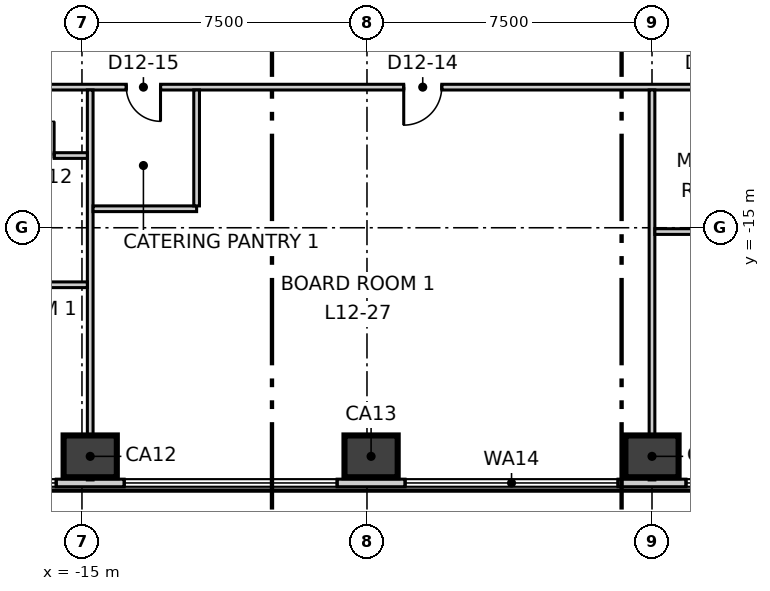
"""IFC4 building model, lengths in metres.
Left out: names, types, materials, properties, quantities, classifications, styles, units other than length and angle.
Written with IfcOpenShell. Run it as: python <this file> out.ifc"""

import sys

from ifc_helpers import new_model, si_unit, direction, frame, frame_2d, origin, origin_2d, place, context, subcontext, project, spatial, rectangle, extrude, element, fill, save


model = new_model("IFC4")
c1 = context("Model", 3, precision=1e-05, world=origin(), true_north=direction((0.0, 1.0)))
c2 = subcontext(c1, "Body", "Model", "MODEL_VIEW")
j1 = project(units=[si_unit("LENGTHUNIT", "METRE"), si_unit("PLANEANGLEUNIT", "RADIAN")], contexts=[c1])
p1 = place(None, origin())
s1 = spatial("IfcSite", under=j1, at=p1, CompositionType="ELEMENT")
p2 = place(p1, origin())
s2 = spatial("IfcBuilding", under=s1, at=p2, CompositionType="ELEMENT")
p3 = place(p2, frame((0.0, 0.0, 59.3)))
s3 = spatial("IfcBuildingStorey", under=s2, at=p3, CompositionType="ELEMENT", Elevation=59.3)
for number, where, z_axis, x_axis in (
    (1, (-14.783, -21.015, -0.3), (0.0, 0.0, 1.0), (1.0, 0.0, 0.0)),
    (2, (-7.392, -21.015, -0.3), (0.0, 0.0, 1.0), (1.0, 0.0, 0.0)),
    (3, (0.0, -21.015, -0.3), (0.0, 0.0, 1.0), (1.0, 0.0, 0.0)),
):
    element("IfcColumn", number, at=place(p3, frame(where, z_axis=z_axis, x_axis=x_axis)), inside=s3, PredefinedType="COLUMN", context=c2, shape_type="SweptSolid", body=[
        extrude(rectangle(XDim=1.4, YDim=1.1, at=origin_2d()), origin(), (0.0, 0.0, 1.0), 4.0),
    ])
p4 = place(p3, frame((-3.371, 37.591, 0.0), z_axis=(0.0, 0.0, 1.0), x_axis=(-0.500006313899, -0.866021758423, 0.0)))
e4 = element("IfcWall", 4, at=p4, inside=s3, PredefinedType="ELEMENTEDWALL", context=c2, shape_type="SweptSolid", body=[
    extrude(rectangle(XDim=61.719, YDim=0.2, at=frame_2d((30.859, 0.0))), origin(), (0.0, 0.0, 1.0), 3.7),
])
p5 = place(p4, frame((2.198, 0.0, 0.9)))
e5 = element("IfcOpeningElement", 5, at=p5, cuts=e4, PredefinedType="OPENING", context=c2, shape_type="SweptSolid", body=[
    extrude(rectangle(XDim=5.6, YDim=2.5, at=frame_2d((2.8, 1.25))), frame((0.0, 0.11, 0.0), z_axis=(0.0, -1.0, 0.0), x_axis=(1.0, 0.0, 0.0)), (0.0, 0.0, 1.0), 0.22),
])
p6 = place(p4, frame((9.59, 0.0, 0.9)))
e6 = element("IfcOpeningElement", 6, at=p6, cuts=e4, PredefinedType="OPENING", context=c2, shape_type="SweptSolid", body=[
    extrude(rectangle(XDim=5.6, YDim=2.5, at=frame_2d((2.8, 1.25))), frame((0.0, 0.11, 0.0), z_axis=(0.0, -1.0, 0.0), x_axis=(1.0, 0.0, 0.0)), (0.0, 0.0, 1.0), 0.22),
])
p7 = place(p4, frame((16.982, 0.0, 0.9)))
e7 = element("IfcOpeningElement", 7, at=p7, cuts=e4, PredefinedType="OPENING", context=c2, shape_type="SweptSolid", body=[
    extrude(rectangle(XDim=5.6, YDim=2.5, at=frame_2d((2.8, 1.25))), frame((0.0, 0.11, 0.0), z_axis=(0.0, -1.0, 0.0), x_axis=(1.0, 0.0, 0.0)), (0.0, 0.0, 1.0), 0.22),
])
p8 = place(p4, frame((24.373, 0.0, 0.9)))
e8 = element("IfcOpeningElement", 8, at=p8, cuts=e4, PredefinedType="OPENING", context=c2, shape_type="SweptSolid", body=[
    extrude(rectangle(XDim=5.6, YDim=2.5, at=frame_2d((2.8, 1.25))), frame((0.0, 0.11, 0.0), z_axis=(0.0, -1.0, 0.0), x_axis=(1.0, 0.0, 0.0)), (0.0, 0.0, 1.0), 0.22),
])
p9 = place(p4, frame((31.765, 0.0, 0.9)))
e9 = element("IfcOpeningElement", 9, at=p9, cuts=e4, PredefinedType="OPENING", context=c2, shape_type="SweptSolid", body=[
    extrude(rectangle(XDim=5.6, YDim=2.5, at=frame_2d((2.8, 1.25))), frame((0.0, 0.11, 0.0), z_axis=(0.0, -1.0, 0.0), x_axis=(1.0, 0.0, 0.0)), (0.0, 0.0, 1.0), 0.22),
])
p10 = place(p4, frame((39.157, 0.0, 0.9)))
e10 = element("IfcOpeningElement", 10, at=p10, cuts=e4, PredefinedType="OPENING", context=c2, shape_type="SweptSolid", body=[
    extrude(rectangle(XDim=5.6, YDim=2.5, at=frame_2d((2.8, 1.25))), frame((0.0, 0.11, 0.0), z_axis=(0.0, -1.0, 0.0), x_axis=(1.0, 0.0, 0.0)), (0.0, 0.0, 1.0), 0.22),
])
p11 = place(p4, frame((46.548, 0.0, 0.9)))
e11 = element("IfcOpeningElement", 11, at=p11, cuts=e4, PredefinedType="OPENING", context=c2, shape_type="SweptSolid", body=[
    extrude(rectangle(XDim=5.6, YDim=2.5, at=frame_2d((2.8, 1.25))), frame((0.0, 0.11, 0.0), z_axis=(0.0, -1.0, 0.0), x_axis=(1.0, 0.0, 0.0)), (0.0, 0.0, 1.0), 0.22),
])
p12 = place(p4, frame((53.94, 0.0, 0.9)))
e12 = element("IfcOpeningElement", 12, at=p12, cuts=e4, PredefinedType="OPENING", context=c2, shape_type="SweptSolid", body=[
    extrude(rectangle(XDim=5.6, YDim=2.5, at=frame_2d((2.8, 1.25))), frame((0.0, 0.11, 0.0), z_axis=(0.0, -1.0, 0.0), x_axis=(1.0, 0.0, 0.0)), (0.0, 0.0, 1.0), 0.22),
])
p13 = place(p3, frame((-30.869, -21.715, 0.0), z_axis=(0.0, 0.0, 1.0), x_axis=(1.0, 0.0, 0.0)))
e13 = element("IfcWall", 13, at=p13, inside=s3, PredefinedType="ELEMENTEDWALL", context=c2, shape_type="SweptSolid", body=[
    extrude(rectangle(XDim=61.718, YDim=0.2, at=frame_2d((30.859, 0.0))), origin(), (0.0, 0.0, 1.0), 3.7),
])
p14 = place(p13, frame((2.199, 0.0, 0.9)))
e14 = element("IfcOpeningElement", 14, at=p14, cuts=e13, PredefinedType="OPENING", context=c2, shape_type="SweptSolid", body=[
    extrude(rectangle(XDim=5.6, YDim=2.5, at=frame_2d((2.8, 1.25))), frame((0.0, 0.11, 0.0), z_axis=(0.0, -1.0, 0.0), x_axis=(1.0, 0.0, 0.0)), (0.0, 0.0, 1.0), 0.22),
])
p15 = place(p13, frame((9.59, 0.0, 0.9)))
e15 = element("IfcOpeningElement", 15, at=p15, cuts=e13, PredefinedType="OPENING", context=c2, shape_type="SweptSolid", body=[
    extrude(rectangle(XDim=5.6, YDim=2.5, at=frame_2d((2.8, 1.25))), frame((0.0, 0.11, 0.0), z_axis=(0.0, -1.0, 0.0), x_axis=(1.0, 0.0, 0.0)), (0.0, 0.0, 1.0), 0.22),
])
p16 = place(p13, frame((16.982, 0.0, 0.9)))
e16 = element("IfcOpeningElement", 16, at=p16, cuts=e13, PredefinedType="OPENING", context=c2, shape_type="SweptSolid", body=[
    extrude(rectangle(XDim=5.6, YDim=2.5, at=frame_2d((2.8, 1.25))), frame((0.0, 0.11, 0.0), z_axis=(0.0, -1.0, 0.0), x_axis=(1.0, 0.0, 0.0)), (0.0, 0.0, 1.0), 0.22),
])
p17 = place(p13, frame((24.373, 0.0, 0.9)))
e17 = element("IfcOpeningElement", 17, at=p17, cuts=e13, PredefinedType="OPENING", context=c2, shape_type="SweptSolid", body=[
    extrude(rectangle(XDim=5.6, YDim=2.5, at=frame_2d((2.8, 1.25))), frame((0.0, 0.11, 0.0), z_axis=(0.0, -1.0, 0.0), x_axis=(1.0, 0.0, 0.0)), (0.0, 0.0, 1.0), 0.22),
])
p18 = place(p13, frame((31.765, 0.0, 0.9)))
e18 = element("IfcOpeningElement", 18, at=p18, cuts=e13, PredefinedType="OPENING", context=c2, shape_type="SweptSolid", body=[
    extrude(rectangle(XDim=5.6, YDim=2.5, at=frame_2d((2.8, 1.25))), frame((0.0, 0.11, 0.0), z_axis=(0.0, -1.0, 0.0), x_axis=(1.0, 0.0, 0.0)), (0.0, 0.0, 1.0), 0.22),
])
p19 = place(p13, frame((39.156, 0.0, 0.9)))
e19 = element("IfcOpeningElement", 19, at=p19, cuts=e13, PredefinedType="OPENING", context=c2, shape_type="SweptSolid", body=[
    extrude(rectangle(XDim=5.6, YDim=2.5, at=frame_2d((2.8, 1.25))), frame((0.0, 0.11, 0.0), z_axis=(0.0, -1.0, 0.0), x_axis=(1.0, 0.0, 0.0)), (0.0, 0.0, 1.0), 0.22),
])
p20 = place(p13, frame((46.548, 0.0, 0.9)))
e20 = element("IfcOpeningElement", 20, at=p20, cuts=e13, PredefinedType="OPENING", context=c2, shape_type="SweptSolid", body=[
    extrude(rectangle(XDim=5.6, YDim=2.5, at=frame_2d((2.8, 1.25))), frame((0.0, 0.11, 0.0), z_axis=(0.0, -1.0, 0.0), x_axis=(1.0, 0.0, 0.0)), (0.0, 0.0, 1.0), 0.22),
])
p21 = place(p13, frame((53.939, 0.0, 0.9)))
e21 = element("IfcOpeningElement", 21, at=p21, cuts=e13, PredefinedType="OPENING", context=c2, shape_type="SweptSolid", body=[
    extrude(rectangle(XDim=5.6, YDim=2.5, at=frame_2d((2.8, 1.25))), frame((0.0, 0.11, 0.0), z_axis=(0.0, -1.0, 0.0), x_axis=(1.0, 0.0, 0.0)), (0.0, 0.0, 1.0), 0.22),
])
p22 = place(p3, frame((-19.497, -11.17, 0.0), z_axis=(0.0, 0.0, 1.0), x_axis=(0.499998854553, 0.866026065108, 0.0)))
e22 = element("IfcWall", 22, at=p22, inside=s3, PredefinedType="PARTITIONING", context=c2, shape_type="SweptSolid", body=[
    extrude(rectangle(XDim=38.994, YDim=0.15, at=frame_2d((19.497, 0.0))), origin(), (0.0, 0.0, 1.0), 3.7),
])
p23 = place(p22, frame((36.044, 0.0, 0.0)))
e23 = element("IfcOpeningElement", 23, at=p23, cuts=e22, PredefinedType="OPENING", context=c2, shape_type="SweptSolid", body=[
    extrude(rectangle(XDim=1.1, YDim=2.1, at=frame_2d((0.55, 1.05))), frame((0.0, 0.085, 0.0), z_axis=(0.0, -1.0, 0.0), x_axis=(1.0, 0.0, 0.0)), (0.0, 0.0, 1.0), 0.17),
])
p24 = place(p22, frame((21.855, 0.0, 0.0)))
e24 = element("IfcOpeningElement", 24, at=p24, cuts=e22, PredefinedType="OPENING", context=c2, shape_type="SweptSolid", body=[
    extrude(rectangle(XDim=1.1, YDim=2.1, at=frame_2d((0.55, 1.05))), frame((0.0, 0.085, 0.0), z_axis=(0.0, -1.0, 0.0), x_axis=(1.0, 0.0, 0.0)), (0.0, 0.0, 1.0), 0.17),
])
p25 = place(p22, frame((32.155, 0.0, 0.0)))
e25 = element("IfcOpeningElement", 25, at=p25, cuts=e22, PredefinedType="OPENING", context=c2, shape_type="SweptSolid", body=[
    extrude(rectangle(XDim=0.9, YDim=2.1, at=frame_2d((0.45, 1.05))), frame((0.0, 0.085, 0.0), z_axis=(0.0, -1.0, 0.0), x_axis=(1.0, 0.0, 0.0)), (0.0, 0.0, 1.0), 0.17),
])
p26 = place(p22, frame((28.955, 0.0, 0.0)))
e26 = element("IfcOpeningElement", 26, at=p26, cuts=e22, PredefinedType="OPENING", context=c2, shape_type="SweptSolid", body=[
    extrude(rectangle(XDim=0.9, YDim=2.1, at=frame_2d((0.45, 1.05))), frame((0.0, 0.085, 0.0), z_axis=(0.0, -1.0, 0.0), x_axis=(1.0, 0.0, 0.0)), (0.0, 0.0, 1.0), 0.17),
])
p27 = place(p22, frame((26.055, 0.0, 0.0)))
e27 = element("IfcOpeningElement", 27, at=p27, cuts=e22, PredefinedType="OPENING", context=c2, shape_type="SweptSolid", body=[
    extrude(rectangle(XDim=1.0, YDim=2.1, at=frame_2d((0.5, 1.05))), frame((0.0, 0.085, 0.0), z_axis=(0.0, -1.0, 0.0), x_axis=(1.0, 0.0, 0.0)), (0.0, 0.0, 1.0), 0.17),
])
p28 = place(p22, frame((10.373, 0.0, 0.0)))
e28 = element("IfcOpeningElement", 28, at=p28, cuts=e22, PredefinedType="OPENING", context=c2, shape_type="SweptSolid", body=[
    extrude(rectangle(XDim=1.0, YDim=2.1, at=frame_2d((0.5, 1.05))), frame((0.0, 0.085, 0.0), z_axis=(0.0, -1.0, 0.0), x_axis=(1.0, 0.0, 0.0)), (0.0, 0.0, 1.0), 0.17),
])
p29 = place(p22, frame((17.773, 0.0, 0.0)))
e29 = element("IfcOpeningElement", 29, at=p29, cuts=e22, PredefinedType="OPENING", context=c2, shape_type="SweptSolid", body=[
    extrude(rectangle(XDim=0.9, YDim=2.1, at=frame_2d((0.45, 1.05))), frame((0.0, 0.085, 0.0), z_axis=(0.0, -1.0, 0.0), x_axis=(1.0, 0.0, 0.0)), (0.0, 0.0, 1.0), 0.17),
])
p30 = place(p22, frame((1.689, 0.0, 0.0)))
e30 = element("IfcOpeningElement", 30, at=p30, cuts=e22, PredefinedType="OPENING", context=c2, shape_type="SweptSolid", body=[
    extrude(rectangle(XDim=1.1, YDim=2.1, at=frame_2d((0.55, 1.05))), frame((0.0, 0.085, 0.0), z_axis=(0.0, -1.0, 0.0), x_axis=(1.0, 0.0, 0.0)), (0.0, 0.0, 1.0), 0.17),
])
p31 = place(p3, frame((-19.422, -11.3, 0.0), z_axis=(0.0, 0.0, 1.0), x_axis=(1.0, 0.0, 0.0)))
e31 = element("IfcWall", 31, at=p31, inside=s3, PredefinedType="PARTITIONING", context=c2, shape_type="SweptSolid", body=[
    extrude(rectangle(XDim=38.994, YDim=0.15, at=frame_2d((19.497, 0.0))), origin(), (0.0, 0.0, 1.0), 3.7),
])
p32 = place(p31, frame((1.7, 0.0, 0.0)))
e32 = element("IfcOpeningElement", 32, at=p32, cuts=e31, PredefinedType="OPENING", context=c2, shape_type="SweptSolid", body=[
    extrude(rectangle(XDim=1.1, YDim=2.1, at=frame_2d((0.55, 1.05))), frame((0.0, 0.085, 0.0), z_axis=(0.0, -1.0, 0.0), x_axis=(1.0, 0.0, 0.0)), (0.0, 0.0, 1.0), 0.17),
])
p33 = place(p31, frame((12.889, 0.0, 0.0)))
e33 = element("IfcOpeningElement", 33, at=p33, cuts=e31, PredefinedType="OPENING", context=c2, shape_type="SweptSolid", body=[
    extrude(rectangle(XDim=1.0, YDim=2.1, at=frame_2d((0.5, 1.05))), frame((0.0, 0.085, 0.0), z_axis=(0.0, -1.0, 0.0), x_axis=(1.0, 0.0, 0.0)), (0.0, 0.0, 1.0), 0.17),
])
p34 = place(p31, frame((5.589, 0.0, 0.0)))
e34 = element("IfcOpeningElement", 34, at=p34, cuts=e31, PredefinedType="OPENING", context=c2, shape_type="SweptSolid", body=[
    extrude(rectangle(XDim=0.9, YDim=2.1, at=frame_2d((0.45, 1.05))), frame((0.0, 0.085, 0.0), z_axis=(0.0, -1.0, 0.0), x_axis=(1.0, 0.0, 0.0)), (0.0, 0.0, 1.0), 0.17),
])
p35 = place(p31, frame((29.272, 0.0, 0.0)))
e35 = element("IfcOpeningElement", 35, at=p35, cuts=e31, PredefinedType="OPENING", context=c2, shape_type="SweptSolid", body=[
    extrude(rectangle(XDim=1.1, YDim=2.1, at=frame_2d((0.55, 1.05))), frame((0.0, 0.085, 0.0), z_axis=(0.0, -1.0, 0.0), x_axis=(1.0, 0.0, 0.0)), (0.0, 0.0, 1.0), 0.17),
])
p36 = place(p31, frame((20.772, 0.0, 0.0)))
e36 = element("IfcOpeningElement", 36, at=p36, cuts=e31, PredefinedType="OPENING", context=c2, shape_type="SweptSolid", body=[
    extrude(rectangle(XDim=0.9, YDim=2.1, at=frame_2d((0.45, 1.05))), frame((0.0, 0.085, 0.0), z_axis=(0.0, -1.0, 0.0), x_axis=(1.0, 0.0, 0.0)), (0.0, 0.0, 1.0), 0.17),
])
p37 = place(p31, frame((23.772, 0.0, 0.0)))
e37 = element("IfcOpeningElement", 37, at=p37, cuts=e31, PredefinedType="OPENING", context=c2, shape_type="SweptSolid", body=[
    extrude(rectangle(XDim=0.9, YDim=2.1, at=frame_2d((0.45, 1.05))), frame((0.0, 0.085, 0.0), z_axis=(0.0, -1.0, 0.0), x_axis=(1.0, 0.0, 0.0)), (0.0, 0.0, 1.0), 0.17),
])
p38 = place(p31, frame((36.055, 0.0, 0.0)))
e38 = element("IfcOpeningElement", 38, at=p38, cuts=e31, PredefinedType="OPENING", context=c2, shape_type="SweptSolid", body=[
    extrude(rectangle(XDim=1.1, YDim=2.1, at=frame_2d((0.55, 1.05))), frame((0.0, 0.085, 0.0), z_axis=(0.0, -1.0, 0.0), x_axis=(1.0, 0.0, 0.0)), (0.0, 0.0, 1.0), 0.17),
])
p39 = place(p3, frame((-14.783, -21.635, 0.0), z_axis=(0.0, 0.0, 1.0), x_axis=(0.0, 1.0, 0.0)))
e39 = element("IfcWall", 39, at=p39, inside=s3, PredefinedType="PARTITIONING", context=c2, shape_type="SweptSolid", body=[
    extrude(rectangle(XDim=10.26, YDim=0.15, at=frame_2d((5.13, 0.0))), origin(), (0.0, 0.0, 1.0), 3.7),
])
p40 = place(p3, frame((-14.708, -14.5, 0.0), z_axis=(0.0, 0.0, 1.0), x_axis=(1.0, 0.0, 0.0)))
e40 = element("IfcWall", 40, at=p40, inside=s3, PredefinedType="PARTITIONING", context=c2, shape_type="SweptSolid", body=[
    extrude(rectangle(XDim=2.725, YDim=0.15, at=frame_2d((1.363, 0.0))), origin(), (0.0, 0.0, 1.0), 3.7),
])
p41 = place(p3, frame((-11.983, -14.425, 0.0), z_axis=(0.0, 0.0, 1.0), x_axis=(0.0, 1.0, 0.0)))
e41 = element("IfcWall", 41, at=p41, inside=s3, PredefinedType="PARTITIONING", context=c2, shape_type="SweptSolid", body=[
    extrude(rectangle(XDim=3.05, YDim=0.15, at=frame_2d((1.525, 0.0))), origin(), (0.0, 0.0, 1.0), 3.7),
])
p42 = place(p3, frame((0.0, -21.635, 0.0), z_axis=(0.0, 0.0, 1.0), x_axis=(0.0, 1.0, 0.0)))
e42 = element("IfcWall", 42, at=p42, inside=s3, PredefinedType="PARTITIONING", context=c2, shape_type="SweptSolid", body=[
    extrude(rectangle(XDim=10.26, YDim=0.15, at=frame_2d((5.13, 0.0))), origin(), (0.0, 0.0, 1.0), 3.2),
])
p43 = place(p3, frame((0.075, -15.1, 0.0), z_axis=(0.0, 0.0, 1.0), x_axis=(1.0, 0.0, 0.0)))
e43 = element("IfcWall", 43, at=p43, inside=s3, PredefinedType="PARTITIONING", context=c2, shape_type="SweptSolid", body=[
    extrude(rectangle(XDim=3.525, YDim=0.15, at=frame_2d((1.763, 0.0))), origin(), (0.0, 0.0, 1.0), 3.7),
])
p44 = place(p3, frame((0.075, 22.47, 0.0), z_axis=(0.0, 0.0, 1.0), x_axis=(0.500002280369, -0.866024087209, 0.0)))
e44 = element("IfcWall", 44, at=p44, inside=s3, PredefinedType="PARTITIONING", context=c2, shape_type="SweptSolid", body=[
    extrude(rectangle(XDim=38.844, YDim=0.15, at=frame_2d((19.422, 0.0))), origin(), (0.0, 0.0, 1.0), 3.7),
])
p45 = place(p44, frame((36.044, 0.0, 0.0)))
e45 = element("IfcOpeningElement", 45, at=p45, cuts=e44, PredefinedType="OPENING", context=c2, shape_type="SweptSolid", body=[
    extrude(rectangle(XDim=1.1, YDim=2.1, at=frame_2d((0.55, 1.05))), frame((0.0, 0.085, 0.0), z_axis=(0.0, -1.0, 0.0), x_axis=(1.0, 0.0, 0.0)), (0.0, 0.0, 1.0), 0.17),
])
p46 = place(p44, frame((26.255, 0.0, 0.0)))
e46 = element("IfcOpeningElement", 46, at=p46, cuts=e44, PredefinedType="OPENING", context=c2, shape_type="SweptSolid", body=[
    extrude(rectangle(XDim=1.1, YDim=2.1, at=frame_2d((0.55, 1.05))), frame((0.0, 0.085, 0.0), z_axis=(0.0, -1.0, 0.0), x_axis=(1.0, 0.0, 0.0)), (0.0, 0.0, 1.0), 0.17),
])
p47 = place(p44, frame((9.173, 0.0, 0.0)))
e47 = element("IfcOpeningElement", 47, at=p47, cuts=e44, PredefinedType="OPENING", context=c2, shape_type="SweptSolid", body=[
    extrude(rectangle(XDim=1.1, YDim=2.1, at=frame_2d((0.55, 1.05))), frame((0.0, 0.085, 0.0), z_axis=(0.0, -1.0, 0.0), x_axis=(1.0, 0.0, 0.0)), (0.0, 0.0, 1.0), 0.17),
])
p48 = place(p44, frame((17.373, 0.0, 0.0)))
e48 = element("IfcOpeningElement", 48, at=p48, cuts=e44, PredefinedType="OPENING", context=c2, shape_type="SweptSolid", body=[
    extrude(rectangle(XDim=0.9, YDim=2.1, at=frame_2d((0.45, 1.05))), frame((0.0, 0.085, 0.0), z_axis=(0.0, -1.0, 0.0), x_axis=(1.0, 0.0, 0.0)), (0.0, 0.0, 1.0), 0.17),
])
p49 = place(p44, frame((14.173, 0.0, 0.0)))
e49 = element("IfcOpeningElement", 49, at=p49, cuts=e44, PredefinedType="OPENING", context=c2, shape_type="SweptSolid", body=[
    extrude(rectangle(XDim=0.9, YDim=2.1, at=frame_2d((0.45, 1.05))), frame((0.0, 0.085, 0.0), z_axis=(0.0, -1.0, 0.0), x_axis=(1.0, 0.0, 0.0)), (0.0, 0.0, 1.0), 0.17),
])
p50 = place(p44, frame((11.273, 0.0, 0.0)))
e50 = element("IfcOpeningElement", 50, at=p50, cuts=e44, PredefinedType="OPENING", context=c2, shape_type="SweptSolid", body=[
    extrude(rectangle(XDim=1.0, YDim=2.1, at=frame_2d((0.5, 1.05))), frame((0.0, 0.085, 0.0), z_axis=(0.0, -1.0, 0.0), x_axis=(1.0, 0.0, 0.0)), (0.0, 0.0, 1.0), 0.17),
])
p51 = place(p44, frame((1.689, 0.0, 0.0)))
e51 = element("IfcOpeningElement", 51, at=p51, cuts=e44, PredefinedType="OPENING", context=c2, shape_type="SweptSolid", body=[
    extrude(rectangle(XDim=1.1, YDim=2.1, at=frame_2d((0.55, 1.05))), frame((0.0, 0.085, 0.0), z_axis=(0.0, -1.0, 0.0), x_axis=(1.0, 0.0, 0.0)), (0.0, 0.0, 1.0), 0.17),
])
p52 = place(p3, frame((-20.383, -16.5, 0.0), z_axis=(0.0, 0.0, 1.0), x_axis=(1.0, 0.0, 0.0)))
e52 = element("IfcWall", 52, at=p52, inside=s3, PredefinedType="PARTITIONING", context=c2, shape_type="SweptSolid", body=[
    extrude(rectangle(XDim=5.525, YDim=0.15, at=frame_2d((2.763, 0.0))), origin(), (0.0, 0.0, 1.0), 3.7),
])
p53 = place(p3, frame((-20.383, -13.1, 0.0), z_axis=(0.0, 0.0, 1.0), x_axis=(1.0, 0.0, 0.0)))
e53 = element("IfcWall", 53, at=p53, inside=s3, PredefinedType="PARTITIONING", context=c2, shape_type="SweptSolid", body=[
    extrude(rectangle(XDim=5.525, YDim=0.15, at=frame_2d((2.763, 0.0))), origin(), (0.0, 0.0, 1.0), 3.7),
])
p54 = place(p53, frame((3.75, 0.0, 0.0)))
e54 = element("IfcOpeningElement", 54, at=p54, cuts=e53, PredefinedType="OPENING", context=c2, shape_type="SweptSolid", body=[
    extrude(rectangle(XDim=0.9, YDim=2.1, at=frame_2d((0.45, 1.05))), frame((0.0, 0.085, 0.0), z_axis=(0.0, -1.0, 0.0), x_axis=(1.0, 0.0, 0.0)), (0.0, 0.0, 1.0), 0.17),
])
p55 = place(p15, origin())
e55 = element("IfcWindow", 55, at=p55, inside=s3, PartitioningType="SINGLE_PANEL", PredefinedType="WINDOW", context=c2, shape_type="SweptSolid", body=[
    extrude(rectangle(XDim=5.6, YDim=2.5, at=frame_2d((2.8, 1.25))), frame((0.0, 0.03, 0.0), z_axis=(0.0, -1.0, 0.0), x_axis=(1.0, 0.0, 0.0)), (0.0, 0.0, 1.0), 0.06),
])
fill(e15, e55)
p56 = place(p16, origin())
e56 = element("IfcWindow", 56, at=p56, inside=s3, PartitioningType="SINGLE_PANEL", PredefinedType="WINDOW", context=c2, shape_type="SweptSolid", body=[
    extrude(rectangle(XDim=5.6, YDim=2.5, at=frame_2d((2.8, 1.25))), frame((0.0, 0.03, 0.0), z_axis=(0.0, -1.0, 0.0), x_axis=(1.0, 0.0, 0.0)), (0.0, 0.0, 1.0), 0.06),
])
fill(e16, e56)
p57 = place(p17, origin())
e57 = element("IfcWindow", 57, at=p57, inside=s3, PartitioningType="SINGLE_PANEL", PredefinedType="WINDOW", context=c2, shape_type="SweptSolid", body=[
    extrude(rectangle(XDim=5.6, YDim=2.5, at=frame_2d((2.8, 1.25))), frame((0.0, 0.03, 0.0), z_axis=(0.0, -1.0, 0.0), x_axis=(1.0, 0.0, 0.0)), (0.0, 0.0, 1.0), 0.06),
])
fill(e17, e57)
p58 = place(p18, origin())
e58 = element("IfcWindow", 58, at=p58, inside=s3, PartitioningType="SINGLE_PANEL", PredefinedType="WINDOW", context=c2, shape_type="SweptSolid", body=[
    extrude(rectangle(XDim=5.6, YDim=2.5, at=frame_2d((2.8, 1.25))), frame((0.0, 0.03, 0.0), z_axis=(0.0, -1.0, 0.0), x_axis=(1.0, 0.0, 0.0)), (0.0, 0.0, 1.0), 0.06),
])
fill(e18, e58)
p59 = place(p54, origin())
e59 = element("IfcDoor", 59, at=p59, inside=s3, OperationType="SINGLE_SWING_LEFT", PredefinedType="DOOR", context=c2, shape_type="SweptSolid", body=[
    extrude(rectangle(XDim=0.9, YDim=2.1, at=frame_2d((0.45, 1.05))), frame((0.0, 0.025, 0.0), z_axis=(0.0, -1.0, 0.0), x_axis=(1.0, 0.0, 0.0)), (0.0, 0.0, 1.0), 0.05),
])
fill(e54, e59)
p60 = place(p33, origin())
e60 = element("IfcDoor", 60, at=p60, inside=s3, OperationType="SINGLE_SWING_LEFT", PredefinedType="DOOR", context=c2, shape_type="SweptSolid", body=[
    extrude(rectangle(XDim=1.0, YDim=2.1, at=frame_2d((0.5, 1.05))), frame((0.0, 0.025, 0.0), z_axis=(0.0, -1.0, 0.0), x_axis=(1.0, 0.0, 0.0)), (0.0, 0.0, 1.0), 0.05),
])
fill(e33, e60)
p61 = place(p34, origin())
e61 = element("IfcDoor", 61, at=p61, inside=s3, OperationType="SINGLE_SWING_RIGHT", PredefinedType="DOOR", context=c2, shape_type="SweptSolid", body=[
    extrude(rectangle(XDim=0.9, YDim=2.1, at=frame_2d((0.45, 1.05))), frame((0.0, 0.025, 0.0), z_axis=(0.0, -1.0, 0.0), x_axis=(1.0, 0.0, 0.0)), (0.0, 0.0, 1.0), 0.05),
])
fill(e34, e61)
save(model, sys.argv[1])
